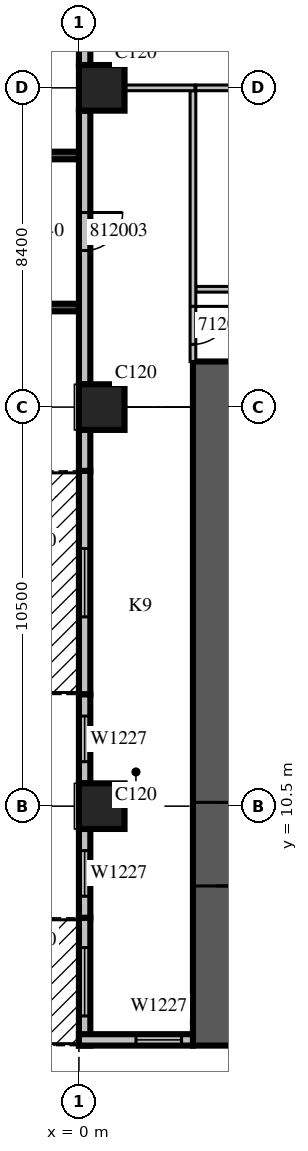
"""IFC4 building model, lengths in metres.
Left out: names, types, materials, properties, quantities, classifications, styles, units other than length and angle.
Written with IfcOpenShell. Run it as: python <this file> out.ifc"""

import sys

from ifc_helpers import new_model, si_unit, direction, frame, frame_2d, origin, origin_2d, place, context, subcontext, project, spatial, rectangle, extrude, source, transform, mapped, element, fill, save


model = new_model("IFC4")
c1 = context("Model", 3, precision=1e-05, world=origin(), true_north=direction((0.0, 1.0)))
c2 = subcontext(c1, "Body", "Model", "MODEL_VIEW")
j1 = project(units=[si_unit("LENGTHUNIT", "METRE"), si_unit("PLANEANGLEUNIT", "RADIAN")], contexts=[c1])
p1 = place(None, origin())
s1 = spatial("IfcSite", under=j1, at=p1, CompositionType="ELEMENT")
p2 = place(p1, origin())
s2 = spatial("IfcBuilding", under=s1, at=p2, CompositionType="ELEMENT")
p3 = place(p2, frame((0.0, 0.0, 61.5)))
s3 = spatial("IfcBuildingStorey", under=s2, at=p3, CompositionType="ELEMENT", Elevation=61.5)
m1 = source(origin(), c2, "Body", "SweptSolid", [
    extrude(rectangle(XDim=1.2, YDim=1.2, at=origin_2d()), origin(), (0.0, 0.0, 1.0), 4.2),
])
for number, where, z_axis, x_axis in (
    (1, (0.6, 10.5, 0.0), (0.0, 0.0, 1.0), (1.0, 0.0, 0.0)),
    (2, (0.6, 21.0, 0.0), (0.0, 0.0, 1.0), (1.0, 0.0, 0.0)),
    (3, (0.6, 29.4, 0.0), (0.0, 0.0, 1.0), (1.0, 0.0, 0.0)),
):
    element("IfcColumn", number, at=place(p3, frame(where, z_axis=z_axis, x_axis=x_axis)), inside=s3, PredefinedType="COLUMN", context=c2, shape_type="MappedRepresentation", body=[
        mapped(m1, transform((0.0, 0.0, 0.0), scale=1.0)),
    ])
m2 = source(origin(), c2, "Body", "SweptSolid", [
    extrude(rectangle(XDim=18.0, YDim=1.2, at=frame_2d((9.0, 0.0))), origin(), (0.0, 0.0, 1.0), 4.2),
])
p4 = place(p3, frame((3.6, 4.2, 0.0), z_axis=(0.0, 0.0, 1.0), x_axis=(0.0, 1.0, 0.0)))
e4 = element("IfcWall", 4, at=p4, inside=s3, PredefinedType="SHEAR", context=c2, shape_type="MappedRepresentation", body=[
    mapped(m2, transform((0.0, 0.0, 0.0), scale=1.0)),
])
m3 = source(origin(), c2, "Body", "SweptSolid", [
    extrude(rectangle(XDim=2.2, YDim=2.1, at=frame_2d((1.1, 1.05))), frame((0.0, 0.61, 0.0), z_axis=(0.0, -1.0, 0.0), x_axis=(1.0, 0.0, 0.0)), (0.0, 0.0, 1.0), 1.22),
])
p5 = place(p4, frame((4.2, 0.0, 0.0)))
e5 = element("IfcOpeningElement", 5, at=p5, cuts=e4, PredefinedType="OPENING", context=c2, shape_type="MappedRepresentation", body=[
    mapped(m3, transform((0.0, 0.0, 0.0), scale=1.0)),
])
m4 = source(origin(), c2, "Body", "SweptSolid", [
    extrude(rectangle(XDim=3.9, YDim=0.2, at=frame_2d((1.95, 0.0))), origin(), (0.0, 0.0, 1.0), 3.8),
])
p6 = place(p3, frame((0.0, 27.62, 0.0), z_axis=(0.0, 0.0, 1.0), x_axis=(-1.0, 0.0, 0.0)))
e6 = element("IfcWall", 6, at=p6, inside=s3, PredefinedType="SOLIDWALL", context=c2, shape_type="MappedRepresentation", body=[
    mapped(m4, transform((0.0, 0.0, 0.0), scale=1.0)),
])
m5 = source(origin(), c2, "Body", "SweptSolid", [
    extrude(rectangle(XDim=2.4, YDim=2.7, at=frame_2d((1.2, 1.35))), frame((0.0, 0.11, 0.0), z_axis=(0.0, -1.0, 0.0), x_axis=(1.0, 0.0, 0.0)), (0.0, 0.0, 1.0), 0.22),
])
p7 = place(p6, frame((0.75, 0.0, 0.6)))
e7 = element("IfcOpeningElement", 7, at=p7, cuts=e6, PredefinedType="OPENING", context=c2, shape_type="MappedRepresentation", body=[
    mapped(m5, transform((0.0, 0.0, 0.0), scale=1.0)),
])
p8 = place(p3, frame((0.0, 23.62, 0.0), z_axis=(0.0, 0.0, 1.0), x_axis=(-1.0, 0.0, 0.0)))
e8 = element("IfcWall", 8, at=p8, inside=s3, PredefinedType="SOLIDWALL", context=c2, shape_type="MappedRepresentation", body=[
    mapped(m4, transform((0.0, 0.0, 0.0), scale=1.0)),
])
p9 = place(p8, frame((0.75, 0.0, 0.6)))
e9 = element("IfcOpeningElement", 9, at=p9, cuts=e8, PredefinedType="OPENING", context=c2, shape_type="MappedRepresentation", body=[
    mapped(m5, transform((0.0, 0.0, 0.0), scale=1.0)),
])
m6 = source(origin(), c2, "Body", "SweptSolid", [
    extrude(rectangle(XDim=7.2, YDim=0.3, at=frame_2d((3.6, 0.0))), origin(), (0.0, 0.0, 1.0), 3.8),
])
p10 = place(p3, frame((0.15, 37.2, 0.0), z_axis=(0.0, 0.0, 1.0), x_axis=(0.0, -1.0, 0.0)))
e10 = element("IfcWall", 10, at=p10, inside=s3, PredefinedType="STANDARD", context=c2, shape_type="MappedRepresentation", body=[
    mapped(m6, transform((0.0, 0.0, 0.0), scale=1.0)),
])
m7 = source(origin(), c2, "Body", "SweptSolid", [
    extrude(rectangle(XDim=1.8, YDim=2.7, at=frame_2d((0.9, 1.35))), frame((0.0, 0.16, 0.0), z_axis=(0.0, -1.0, 0.0), x_axis=(1.0, 0.0, 0.0)), (0.0, 0.0, 1.0), 0.32),
])
p11 = place(p10, frame((0.738, 0.0, 0.6)))
e11 = element("IfcOpeningElement", 11, at=p11, cuts=e10, PredefinedType="OPENING", context=c2, shape_type="MappedRepresentation", body=[
    mapped(m7, transform((0.0, 0.0, 0.0), scale=1.0)),
])
p12 = place(p10, frame((4.175, 0.0, 0.6)))
e12 = element("IfcOpeningElement", 12, at=p12, cuts=e10, PredefinedType="OPENING", context=c2, shape_type="MappedRepresentation", body=[
    mapped(m7, transform((0.0, 0.0, 0.0), scale=1.0)),
])
p13 = place(p3, frame((0.15, 28.8, 0.0), z_axis=(0.0, 0.0, 1.0), x_axis=(0.0, -1.0, 0.0)))
e13 = element("IfcWall", 13, at=p13, inside=s3, PredefinedType="STANDARD", context=c2, shape_type="MappedRepresentation", body=[
    mapped(m6, transform((0.0, 0.0, 0.0), scale=1.0)),
])
m8 = source(origin(), c2, "Body", "SweptSolid", [
    extrude(rectangle(XDim=1.0, YDim=2.1, at=frame_2d((0.5, 1.05))), frame((0.0, 0.16, 0.0), z_axis=(0.0, -1.0, 0.0), x_axis=(1.0, 0.0, 0.0)), (0.0, 0.0, 1.0), 0.32),
])
p14 = place(p13, frame((2.68, 0.0, 0.0)))
e14 = element("IfcOpeningElement", 14, at=p14, cuts=e13, PredefinedType="OPENING", context=c2, shape_type="MappedRepresentation", body=[
    mapped(m8, transform((0.0, 0.0, 0.0), scale=1.0)),
])
m9 = source(origin(), c2, "Body", "SweptSolid", [
    extrude(rectangle(XDim=1.08, YDim=0.3, at=frame_2d((0.54, 0.0))), origin(), (0.0, 0.0, 1.0), 3.8),
])
p15 = place(p3, frame((0.15, 20.4, 0.0), z_axis=(0.0, 0.0, 1.0), x_axis=(0.0, -1.0, 0.0)))
e15 = element("IfcWall", 15, at=p15, inside=s3, PredefinedType="STANDARD", context=c2, shape_type="MappedRepresentation", body=[
    mapped(m9, transform((0.0, 0.0, 0.0), scale=1.0)),
])
m10 = source(origin(), c2, "Body", "SweptSolid", [
    extrude(rectangle(XDim=5.88, YDim=0.3, at=frame_2d((2.94, 0.0))), origin(), (0.0, 0.0, 1.0), 3.8),
])
p16 = place(p3, frame((0.15, 19.32, 0.0), z_axis=(0.0, 0.0, 1.0), x_axis=(0.0, -1.0, 0.0)))
e16 = element("IfcWall", 16, at=p16, inside=s3, PredefinedType="STANDARD", context=c2, shape_type="MappedRepresentation", body=[
    mapped(m10, transform((0.0, 0.0, 0.0), scale=1.0)),
])
m11 = source(origin(), c2, "Body", "SweptSolid", [
    extrude(rectangle(XDim=1.8, YDim=2.4, at=frame_2d((0.9, 1.2))), frame((0.0, 0.16, 0.0), z_axis=(0.0, -1.0, 0.0), x_axis=(1.0, 0.0, 0.0)), (0.0, 0.0, 1.0), 0.32),
])
p17 = place(p16, frame((2.04, 0.0, 0.0)))
e17 = element("IfcOpeningElement", 17, at=p17, cuts=e16, PredefinedType="OPENING", context=c2, shape_type="MappedRepresentation", body=[
    mapped(m11, transform((0.0, 0.0, 0.0), scale=1.0)),
])
m12 = source(origin(), c2, "Body", "SweptSolid", [
    extrude(rectangle(XDim=2.34, YDim=0.3, at=frame_2d((1.17, 0.0))), origin(), (0.0, 0.0, 1.0), 3.8),
])
p18 = place(p3, frame((0.15, 13.44, 0.0), z_axis=(0.0, 0.0, 1.0), x_axis=(0.0, -1.0, 0.0)))
e18 = element("IfcWall", 18, at=p18, inside=s3, PredefinedType="STANDARD", context=c2, shape_type="MappedRepresentation", body=[
    mapped(m12, transform((0.0, 0.0, 0.0), scale=1.0)),
])
m13 = source(origin(), c2, "Body", "SweptSolid", [
    extrude(rectangle(XDim=1.2, YDim=2.7, at=frame_2d((0.6, 1.35))), frame((0.0, 0.16, 0.0), z_axis=(0.0, -1.0, 0.0), x_axis=(1.0, 0.0, 0.0)), (0.0, 0.0, 1.0), 0.32),
])
p19 = place(p18, frame((0.57, 0.0, 0.6)))
e19 = element("IfcOpeningElement", 19, at=p19, cuts=e18, PredefinedType="OPENING", context=c2, shape_type="MappedRepresentation", body=[
    mapped(m13, transform((0.0, 0.0, 0.0), scale=1.0)),
])
p20 = place(p3, frame((0.15, 9.9, 0.0), z_axis=(0.0, 0.0, 1.0), x_axis=(0.0, -1.0, 0.0)))
e20 = element("IfcWall", 20, at=p20, inside=s3, PredefinedType="STANDARD", context=c2, shape_type="MappedRepresentation", body=[
    mapped(m12, transform((0.0, 0.0, 0.0), scale=1.0)),
])
p21 = place(p20, frame((0.57, 0.0, 0.6)))
e21 = element("IfcOpeningElement", 21, at=p21, cuts=e20, PredefinedType="OPENING", context=c2, shape_type="MappedRepresentation", body=[
    mapped(m13, transform((0.0, 0.0, 0.0), scale=1.0)),
])
m14 = source(origin(), c2, "Body", "SweptSolid", [
    extrude(rectangle(XDim=3.36, YDim=0.3, at=frame_2d((1.68, 0.0))), origin(), (0.0, 0.0, 1.0), 3.8),
])
p22 = place(p3, frame((0.15, 7.56, 0.0), z_axis=(0.0, 0.0, 1.0), x_axis=(0.0, -1.0, 0.0)))
e22 = element("IfcWall", 22, at=p22, inside=s3, PredefinedType="STANDARD", context=c2, shape_type="MappedRepresentation", body=[
    mapped(m14, transform((0.0, 0.0, 0.0), scale=1.0)),
])
p23 = place(p22, frame((0.78, 0.0, 0.0)))
e23 = element("IfcOpeningElement", 23, at=p23, cuts=e22, PredefinedType="OPENING", context=c2, shape_type="MappedRepresentation", body=[
    mapped(m11, transform((0.0, 0.0, 0.0), scale=1.0)),
])
m15 = source(origin(), c2, "Body", "SweptSolid", [
    extrude(rectangle(XDim=3.0, YDim=0.3, at=frame_2d((1.5, 0.0))), origin(), (0.0, 0.0, 1.0), 3.8),
])
p24 = place(p3, frame((0.0, 4.35, 0.0), z_axis=(0.0, 0.0, 1.0), x_axis=(1.0, 0.0, 0.0)))
e24 = element("IfcWall", 24, at=p24, inside=s3, PredefinedType="STANDARD", context=c2, shape_type="MappedRepresentation", body=[
    mapped(m15, transform((0.0, 0.0, 0.0), scale=1.0)),
])
p25 = place(p24, frame((1.5, 0.0, 0.6)))
e25 = element("IfcOpeningElement", 25, at=p25, cuts=e24, PredefinedType="OPENING", context=c2, shape_type="MappedRepresentation", body=[
    mapped(m13, transform((0.0, 0.0, 0.0), scale=1.0)),
])
p26 = place(p3, frame((3.075, 24.1, 0.0), z_axis=(0.0, 0.0, 1.0), x_axis=(1.0, 0.0, 0.0)))
e26 = element("IfcWall", 26, at=p26, inside=s3, PredefinedType="PARTITIONING", context=c2, shape_type="SweptSolid", body=[
    extrude(rectangle(XDim=11.625, YDim=0.15, at=frame_2d((5.812, 0.0))), origin(), (0.0, 0.0, 1.0), 3.8),
])
m16 = source(origin(), c2, "Body", "SweptSolid", [
    extrude(rectangle(XDim=0.9, YDim=2.1, at=frame_2d((0.45, 1.05))), frame((0.0, 0.085, 0.0), z_axis=(0.0, -1.0, 0.0), x_axis=(1.0, 0.0, 0.0)), (0.0, 0.0, 1.0), 0.17),
])
p27 = place(p26, frame((3.263, 0.0, 0.0)))
e27 = element("IfcOpeningElement", 27, at=p27, cuts=e26, PredefinedType="OPENING", context=c2, shape_type="MappedRepresentation", body=[
    mapped(m16, transform((0.0, 0.0, 0.0), scale=1.0)),
])
p28 = place(p26, frame((9.95, 0.0, 0.0)))
e28 = element("IfcOpeningElement", 28, at=p28, cuts=e26, PredefinedType="OPENING", context=c2, shape_type="MappedRepresentation", body=[
    mapped(m16, transform((0.0, 0.0, 0.0), scale=1.0)),
])
m17 = source(origin(), c2, "Body", "SweptSolid", [
    extrude(rectangle(XDim=6.826, YDim=0.15, at=frame_2d((3.413, 0.0))), origin(), (0.0, 0.0, 1.0), 3.8),
])
p29 = place(p3, frame((9.901, 29.4, 0.0), z_axis=(0.0, 0.0, 1.0), x_axis=(-1.0, 0.0, 0.0)))
e29 = element("IfcWall", 29, at=p29, inside=s3, PredefinedType="PARTITIONING", context=c2, shape_type="MappedRepresentation", body=[
    mapped(m17, transform((0.0, 0.0, 0.0), scale=1.0)),
])
m18 = source(origin(), c2, "Body", "SweptSolid", [
    extrude(rectangle(XDim=7.125, YDim=0.15, at=frame_2d((3.562, 0.0))), origin(), (0.0, 0.0, 1.0), 3.8),
])
p30 = place(p3, frame((3.0, 29.325, 0.0), z_axis=(0.0, 0.0, 1.0), x_axis=(0.0, -1.0, 0.0)))
e30 = element("IfcWall", 30, at=p30, inside=s3, PredefinedType="PARTITIONING", context=c2, shape_type="MappedRepresentation", body=[
    mapped(m18, transform((0.0, 0.0, 0.0), scale=1.0)),
])
m19 = source(origin(), c2, "Body", "SweptSolid", [
    extrude(rectangle(XDim=1.0, YDim=2.1, at=frame_2d((0.5, 1.05))), frame((0.0, 0.085, 0.0), z_axis=(0.0, -1.0, 0.0), x_axis=(1.0, 0.0, 0.0)), (0.0, 0.0, 1.0), 0.17),
])
p31 = place(p30, frame((5.675, 0.0, 0.0)))
e31 = element("IfcOpeningElement", 31, at=p31, cuts=e30, PredefinedType="OPENING", context=c2, shape_type="MappedRepresentation", body=[
    mapped(m19, transform((0.0, 0.0, 0.0), scale=1.0)),
])
m20 = source(origin(), c2, "Body", "SweptSolid", [
    extrude(rectangle(XDim=1.856, YDim=0.15, at=frame_2d((0.928, 0.0))), origin(), (0.0, 0.0, 1.0), 3.8),
])
p32 = place(p3, frame((3.055, 29.4, 0.0), z_axis=(0.0, 0.0, 1.0), x_axis=(-1.0, 0.0, 0.0)))
e32 = element("IfcWall", 32, at=p32, inside=s3, PredefinedType="PARTITIONING", context=c2, shape_type="MappedRepresentation", body=[
    mapped(m20, transform((0.0, 0.0, 0.0), scale=1.0)),
])
m21 = source(origin(), c2, "Body", "SweptSolid", [
    extrude(rectangle(XDim=1.8, YDim=2.4, at=frame_2d((0.9, 1.2))), frame((0.0, 0.025, 0.0), z_axis=(0.0, -1.0, 0.0), x_axis=(1.0, 0.0, 0.0)), (0.0, 0.0, 1.0), 0.05),
])
p33 = place(p17, origin())
e33 = element("IfcDoor", 33, at=p33, inside=s3, OperationType="SLIDING_TO_LEFT", PredefinedType="DOOR", context=c2, shape_type="MappedRepresentation", body=[
    mapped(m21, transform((0.0, 0.0, 0.0), scale=1.0)),
])
fill(e17, e33)
m22 = source(origin(), c2, "Body", "SweptSolid", [
    extrude(rectangle(XDim=1.2, YDim=2.7, at=frame_2d((0.6, 1.35))), frame((0.0, 0.03, 0.0), z_axis=(0.0, -1.0, 0.0), x_axis=(1.0, 0.0, 0.0)), (0.0, 0.0, 1.0), 0.06),
])
p34 = place(p19, origin())
e34 = element("IfcWindow", 34, at=p34, inside=s3, PartitioningType="SINGLE_PANEL", PredefinedType="WINDOW", context=c2, shape_type="MappedRepresentation", body=[
    mapped(m22, transform((0.0, 0.0, 0.0), scale=1.0)),
])
fill(e19, e34)
p35 = place(p21, origin())
e35 = element("IfcWindow", 35, at=p35, inside=s3, PartitioningType="SINGLE_PANEL", PredefinedType="WINDOW", context=c2, shape_type="MappedRepresentation", body=[
    mapped(m22, transform((0.0, 0.0, 0.0), scale=1.0)),
])
fill(e21, e35)
p36 = place(p23, origin())
e36 = element("IfcDoor", 36, at=p36, inside=s3, OperationType="SLIDING_TO_LEFT", PredefinedType="DOOR", context=c2, shape_type="MappedRepresentation", body=[
    mapped(m21, transform((0.0, 0.0, 0.0), scale=1.0)),
])
fill(e23, e36)
p37 = place(p25, origin())
e37 = element("IfcWindow", 37, at=p37, inside=s3, PartitioningType="SINGLE_PANEL", PredefinedType="WINDOW", context=c2, shape_type="MappedRepresentation", body=[
    mapped(m22, transform((0.0, 0.0, 0.0), scale=1.0)),
])
fill(e25, e37)
m23 = source(origin(), c2, "Body", "SweptSolid", [
    extrude(rectangle(XDim=2.2, YDim=2.1, at=frame_2d((1.1, 1.05))), frame((0.0, 0.025, 0.0), z_axis=(0.0, -1.0, 0.0), x_axis=(1.0, 0.0, 0.0)), (0.0, 0.0, 1.0), 0.05),
])
p38 = place(p5, origin())
e38 = element("IfcDoor", 38, at=p38, inside=s3, OperationType="DOUBLE_DOOR_SINGLE_SWING", PredefinedType="DOOR", context=c2, shape_type="MappedRepresentation", body=[
    mapped(m23, transform((0.0, 0.0, 0.0), scale=1.0)),
])
fill(e5, e38)
m24 = source(origin(), c2, "Body", "SweptSolid", [
    extrude(rectangle(XDim=1.0, YDim=2.1, at=frame_2d((0.5, 1.05))), frame((0.0, 0.025, 0.0), z_axis=(0.0, -1.0, 0.0), x_axis=(1.0, 0.0, 0.0)), (0.0, 0.0, 1.0), 0.05),
])
p39 = place(p31, origin())
e39 = element("IfcDoor", 39, at=p39, inside=s3, OperationType="SINGLE_SWING_LEFT", PredefinedType="DOOR", context=c2, shape_type="MappedRepresentation", body=[
    mapped(m24, transform((0.0, 0.0, 0.0), scale=1.0)),
])
fill(e31, e39)
p40 = place(p14, origin())
e40 = element("IfcDoor", 40, at=p40, inside=s3, OperationType="SINGLE_SWING_LEFT", PredefinedType="DOOR", context=c2, shape_type="MappedRepresentation", body=[
    mapped(m24, transform((0.0, 0.0, 0.0), scale=1.0)),
])
fill(e14, e40)
save(model, sys.argv[1])
